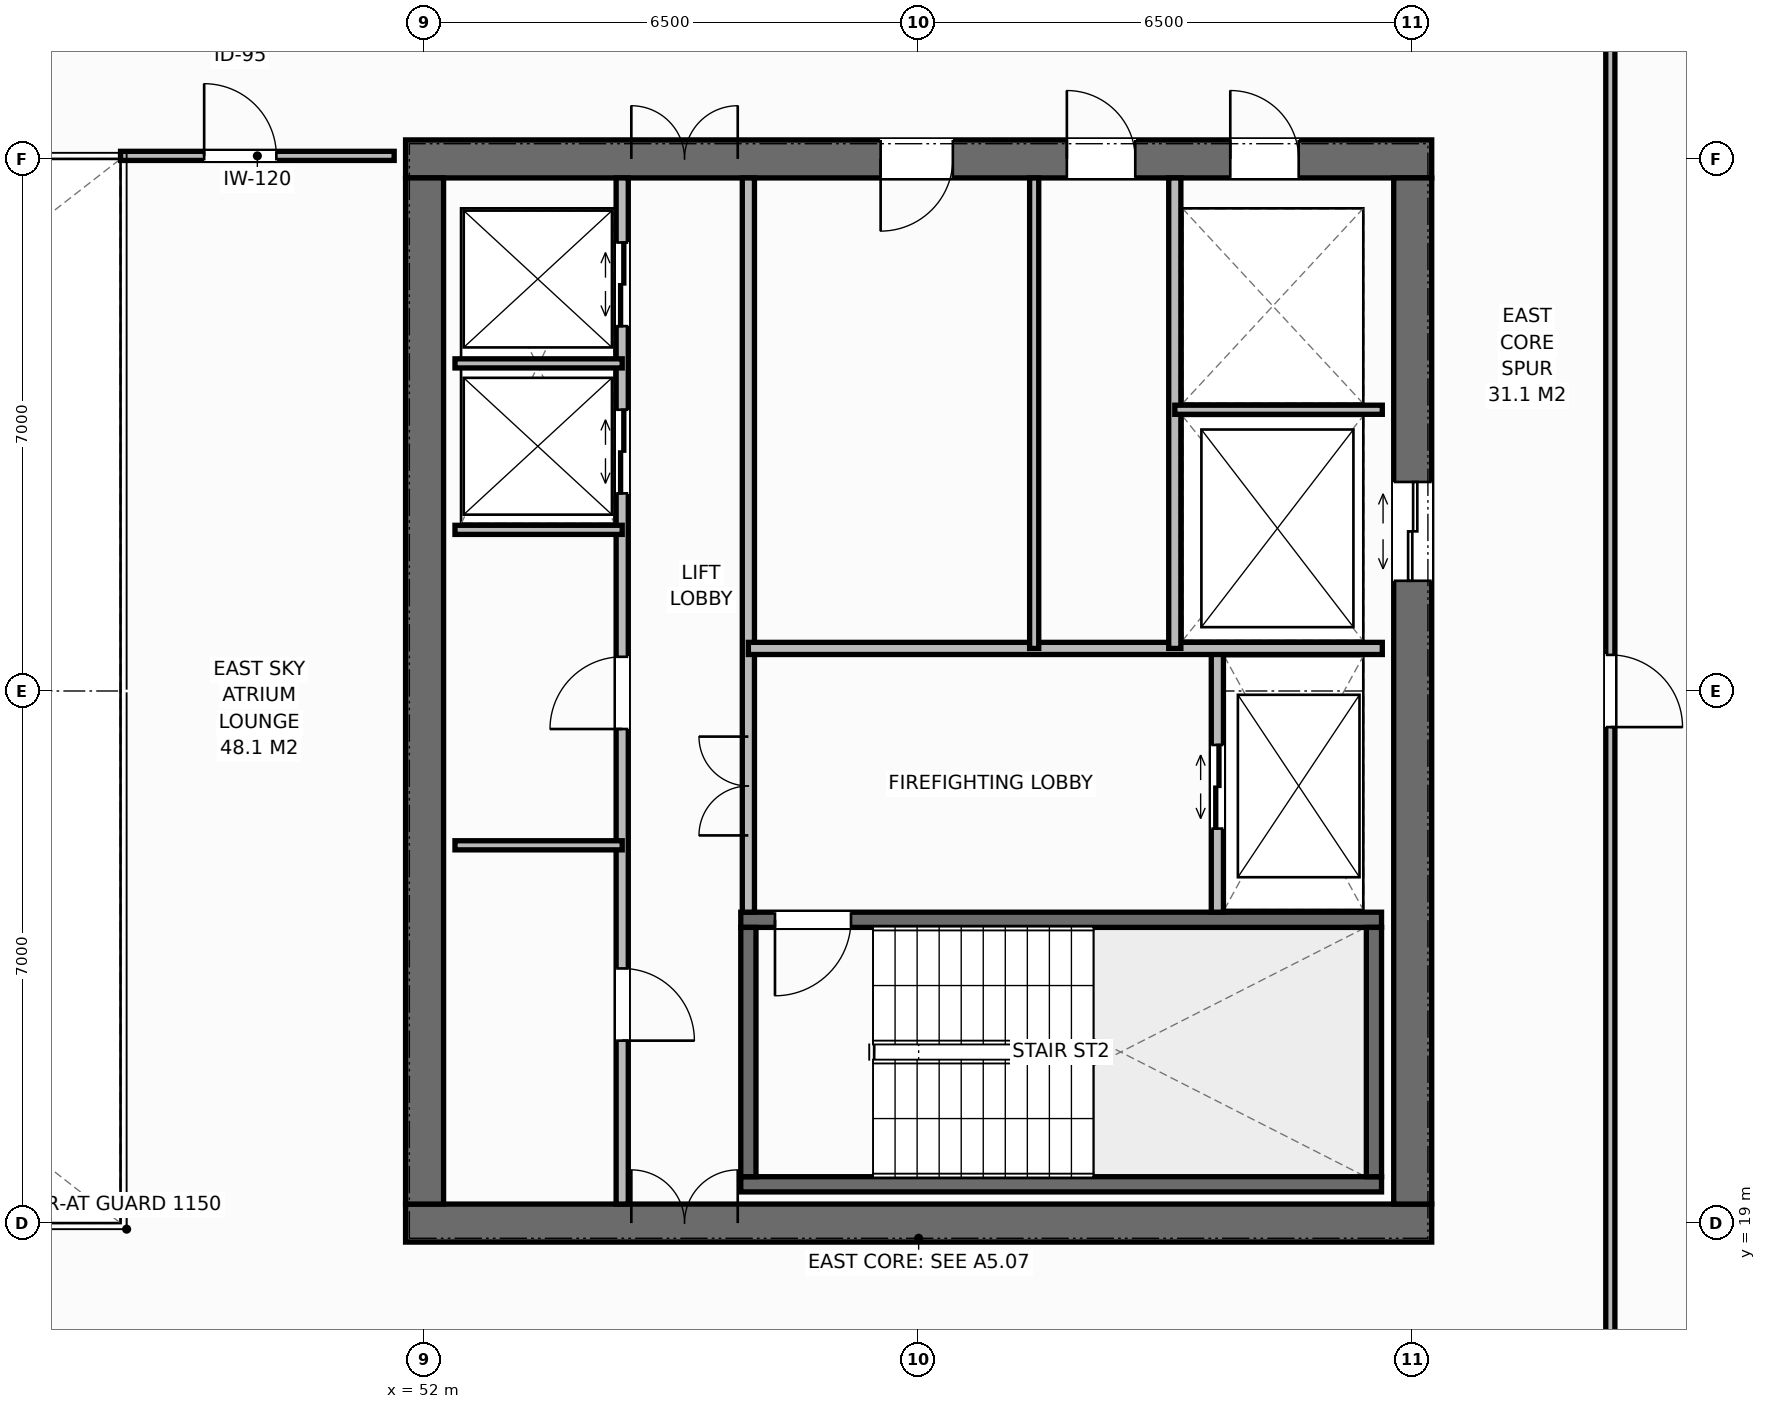
"""IFC4 building model, lengths in metres.
Left out: names, types, materials, properties, quantities, classifications, styles, units other than length and angle.
Written with IfcOpenShell. Run it as: python <this file> out.ifc"""

import sys

from ifc_helpers import new_model, si_unit, direction, frame, frame_2d, origin, place, context, subcontext, project, spatial, rectangle, extrude, element, fill, save


model = new_model("IFC4")
c1 = context("Model", 3, precision=1e-05, world=origin(), true_north=direction((0.0, 1.0)))
c2 = subcontext(c1, "Body", "Model", "MODEL_VIEW")
j1 = project(units=[si_unit("LENGTHUNIT", "METRE"), si_unit("PLANEANGLEUNIT", "RADIAN")], contexts=[c1])
p1 = place(None, origin())
s1 = spatial("IfcSite", under=j1, at=p1, CompositionType="ELEMENT")
p2 = place(p1, origin())
s2 = spatial("IfcBuilding", under=s1, at=p2, CompositionType="ELEMENT")
p3 = place(p2, frame((0.0, 0.0, 225.2)))
s3 = spatial("IfcBuildingStorey", under=s2, at=p3, CompositionType="ELEMENT", Elevation=225.2)
p4 = place(p3, frame((51.75, 19.0, 0.0), z_axis=(0.0, 0.0, 1.0), x_axis=(1.0, 0.0, 0.0)))
e1 = element("IfcWall", 1, at=p4, inside=s3, PredefinedType="SHEAR", context=c2, shape_type="SweptSolid", body=[
    extrude(rectangle(XDim=13.5, YDim=0.5, at=frame_2d((6.75, 0.0))), origin(), (0.0, 0.0, 1.0), 3.8),
])
p5 = place(p4, frame((2.97, 0.0, 0.0)))
e2 = element("IfcOpeningElement", 2, at=p5, cuts=e1, PredefinedType="OPENING", context=c2, shape_type="SweptSolid", body=[
    extrude(rectangle(XDim=1.4, YDim=2.2, at=frame_2d((0.7, 1.1))), frame((0.0, 0.26, 0.0), z_axis=(0.0, -1.0, 0.0), x_axis=(1.0, 0.0, 0.0)), (0.0, 0.0, 1.0), 0.52),
])
p6 = place(p3, frame((51.75, 33.0, 0.0), z_axis=(0.0, 0.0, 1.0), x_axis=(1.0, 0.0, 0.0)))
e3 = element("IfcWall", 3, at=p6, inside=s3, PredefinedType="SHEAR", context=c2, shape_type="SweptSolid", body=[
    extrude(rectangle(XDim=13.5, YDim=0.5, at=frame_2d((6.75, 0.0))), origin(), (0.0, 0.0, 1.0), 3.8),
])
p7 = place(p6, frame((2.97, 0.0, 0.0)))
e4 = element("IfcOpeningElement", 4, at=p7, cuts=e3, PredefinedType="OPENING", context=c2, shape_type="SweptSolid", body=[
    extrude(rectangle(XDim=1.4, YDim=2.2, at=frame_2d((0.7, 1.1))), frame((0.0, 0.26, 0.0), z_axis=(0.0, -1.0, 0.0), x_axis=(1.0, 0.0, 0.0)), (0.0, 0.0, 1.0), 0.52),
])
p8 = place(p6, frame((10.85, 0.0, 0.0)))
e5 = element("IfcOpeningElement", 5, at=p8, cuts=e3, PredefinedType="OPENING", context=c2, shape_type="SweptSolid", body=[
    extrude(rectangle(XDim=0.9, YDim=2.15, at=frame_2d((0.45, 1.075))), frame((0.0, 0.26, 0.0), z_axis=(0.0, -1.0, 0.0), x_axis=(1.0, 0.0, 0.0)), (0.0, 0.0, 1.0), 0.52),
])
p9 = place(p6, frame((6.25, 0.0, 0.0)))
e6 = element("IfcOpeningElement", 6, at=p9, cuts=e3, PredefinedType="OPENING", context=c2, shape_type="SweptSolid", body=[
    extrude(rectangle(XDim=0.95, YDim=2.15, at=frame_2d((0.475, 1.075))), frame((0.0, 0.26, 0.0), z_axis=(0.0, -1.0, 0.0), x_axis=(1.0, 0.0, 0.0)), (0.0, 0.0, 1.0), 0.52),
])
p10 = place(p6, frame((8.7, 0.0, 0.0)))
e7 = element("IfcOpeningElement", 7, at=p10, cuts=e3, PredefinedType="OPENING", context=c2, shape_type="SweptSolid", body=[
    extrude(rectangle(XDim=0.9, YDim=2.15, at=frame_2d((0.45, 1.075))), frame((0.0, 0.26, 0.0), z_axis=(0.0, -1.0, 0.0), x_axis=(1.0, 0.0, 0.0)), (0.0, 0.0, 1.0), 0.52),
])
p11 = place(p3, frame((52.0, 19.25, 0.0), z_axis=(0.0, 0.0, 1.0), x_axis=(0.0, 1.0, 0.0)))
e8 = element("IfcWall", 8, at=p11, inside=s3, PredefinedType="SHEAR", context=c2, shape_type="SweptSolid", body=[
    extrude(rectangle(XDim=13.5, YDim=0.5, at=frame_2d((6.75, 0.0))), origin(), (0.0, 0.0, 1.0), 3.8),
])
p12 = place(p3, frame((65.0, 19.25, 0.0), z_axis=(0.0, 0.0, 1.0), x_axis=(0.0, 1.0, 0.0)))
e9 = element("IfcWall", 9, at=p12, inside=s3, PredefinedType="SHEAR", context=c2, shape_type="SweptSolid", body=[
    extrude(rectangle(XDim=13.5, YDim=0.5, at=frame_2d((6.75, 0.0))), origin(), (0.0, 0.0, 1.0), 3.8),
])
p13 = place(p12, frame((8.2, 0.0, 0.0)))
e10 = element("IfcOpeningElement", 10, at=p13, cuts=e9, PredefinedType="OPENING", context=c2, shape_type="SweptSolid", body=[
    extrude(rectangle(XDim=1.3, YDim=2.2, at=frame_2d((0.65, 1.1))), frame((0.0, 0.26, 0.0), z_axis=(0.0, -1.0, 0.0), x_axis=(1.0, 0.0, 0.0)), (0.0, 0.0, 1.0), 0.52),
])
p14 = place(p3, frame((56.16, 19.51, 0.0), z_axis=(0.0, 0.0, 1.0), x_axis=(1.0, 0.0, 0.0)))
e11 = element("IfcWall", 11, at=p14, inside=s3, PredefinedType="SHEAR", context=c2, shape_type="SweptSolid", body=[
    extrude(rectangle(XDim=8.43, YDim=0.2, at=frame_2d((4.215, 0.0))), origin(), (0.0, 0.0, 1.0), 3.8),
])
p15 = place(p3, frame((56.16, 22.99, 0.0), z_axis=(0.0, 0.0, 1.0), x_axis=(1.0, 0.0, 0.0)))
e12 = element("IfcWall", 12, at=p15, inside=s3, PredefinedType="SHEAR", context=c2, shape_type="SweptSolid", body=[
    extrude(rectangle(XDim=8.43, YDim=0.2, at=frame_2d((4.215, 0.0))), origin(), (0.0, 0.0, 1.0), 3.8),
])
p16 = place(p15, frame((0.45, 0.0, 0.0)))
e13 = element("IfcOpeningElement", 13, at=p16, cuts=e12, PredefinedType="OPENING", context=c2, shape_type="SweptSolid", body=[
    extrude(rectangle(XDim=1.0, YDim=2.15, at=frame_2d((0.5, 1.075))), frame((0.0, 0.11, 0.0), z_axis=(0.0, -1.0, 0.0), x_axis=(1.0, 0.0, 0.0)), (0.0, 0.0, 1.0), 0.22),
])
for number, where, z_axis, x_axis in (
    (14, (56.26, 19.61, 0.0), (0.0, 0.0, 1.0), (0.0, 1.0, 0.0)),
    (15, (64.49, 19.61, 0.0), (0.0, 0.0, 1.0), (0.0, 1.0, 0.0)),
):
    element("IfcWall", number, at=place(p3, frame(where, z_axis=z_axis, x_axis=x_axis)), inside=s3, PredefinedType="SHEAR", context=c2, shape_type="SweptSolid", body=[
        extrude(rectangle(XDim=3.28, YDim=0.2, at=frame_2d((1.64, 0.0))), origin(), (0.0, 0.0, 1.0), 3.8),
    ])
p17 = place(p3, frame((54.6, 19.25, 0.0), z_axis=(0.0, 0.0, 1.0), x_axis=(0.0, 1.0, 0.0)))
e16 = element("IfcWall", 16, at=p17, inside=s3, PredefinedType="STANDARD", context=c2, shape_type="SweptSolid", body=[
    extrude(rectangle(XDim=13.5, YDim=0.16, at=frame_2d((6.75, 0.0))), origin(), (0.0, 0.0, 1.0), 3.58),
])
p18 = place(p17, frame((2.15, 0.0, 0.0)))
e17 = element("IfcOpeningElement", 17, at=p18, cuts=e16, PredefinedType="OPENING", context=c2, shape_type="SweptSolid", body=[
    extrude(rectangle(XDim=0.95, YDim=2.15, at=frame_2d((0.475, 1.075))), frame((0.0, 0.09, 0.0), z_axis=(0.0, -1.0, 0.0), x_axis=(1.0, 0.0, 0.0)), (0.0, 0.0, 1.0), 0.18),
])
p19 = place(p17, frame((6.25, 0.0, 0.0)))
e18 = element("IfcOpeningElement", 18, at=p19, cuts=e16, PredefinedType="OPENING", context=c2, shape_type="SweptSolid", body=[
    extrude(rectangle(XDim=0.95, YDim=2.15, at=frame_2d((0.475, 1.075))), frame((0.0, 0.09, 0.0), z_axis=(0.0, -1.0, 0.0), x_axis=(1.0, 0.0, 0.0)), (0.0, 0.0, 1.0), 0.18),
])
p20 = place(p17, frame((9.35, 0.0, 0.0)))
e19 = element("IfcOpeningElement", 19, at=p20, cuts=e16, PredefinedType="OPENING", context=c2, shape_type="SweptSolid", body=[
    extrude(rectangle(XDim=1.1, YDim=2.2, at=frame_2d((0.55, 1.1))), frame((0.0, 0.09, 0.0), z_axis=(0.0, -1.0, 0.0), x_axis=(1.0, 0.0, 0.0)), (0.0, 0.0, 1.0), 0.18),
])
p21 = place(p17, frame((11.55, 0.0, 0.0)))
e20 = element("IfcOpeningElement", 20, at=p21, cuts=e16, PredefinedType="OPENING", context=c2, shape_type="SweptSolid", body=[
    extrude(rectangle(XDim=1.1, YDim=2.2, at=frame_2d((0.55, 1.1))), frame((0.0, 0.09, 0.0), z_axis=(0.0, -1.0, 0.0), x_axis=(1.0, 0.0, 0.0)), (0.0, 0.0, 1.0), 0.18),
])
p22 = place(p3, frame((56.26, 23.09, 0.0), z_axis=(0.0, 0.0, 1.0), x_axis=(0.0, 1.0, 0.0)))
e21 = element("IfcWall", 21, at=p22, inside=s3, PredefinedType="STANDARD", context=c2, shape_type="SweptSolid", body=[
    extrude(rectangle(XDim=9.66, YDim=0.16, at=frame_2d((4.83, 0.0))), origin(), (0.0, 0.0, 1.0), 3.58),
])
p23 = place(p22, frame((1.01, 0.0, 0.0)))
e22 = element("IfcOpeningElement", 22, at=p23, cuts=e21, PredefinedType="OPENING", context=c2, shape_type="SweptSolid", body=[
    extrude(rectangle(XDim=1.3, YDim=2.2, at=frame_2d((0.65, 1.1))), frame((0.0, 0.09, 0.0), z_axis=(0.0, -1.0, 0.0), x_axis=(1.0, 0.0, 0.0)), (0.0, 0.0, 1.0), 0.18),
])
for number, where, z_axis, x_axis in (
    (23, (52.4, 23.97, 0.0), (0.0, 0.0, 1.0), (1.0, 0.0, 0.0)),
    (24, (52.4, 28.12, 0.0), (0.0, 0.0, 1.0), (1.0, 0.0, 0.0)),
    (25, (52.4, 30.31, 0.0), (0.0, 0.0, 1.0), (1.0, 0.0, 0.0)),
):
    element("IfcWall", number, at=place(p3, frame(where, z_axis=z_axis, x_axis=x_axis)), inside=s3, PredefinedType="PARTITIONING", context=c2, shape_type="SweptSolid", body=[
        extrude(rectangle(XDim=2.2, YDim=0.12, at=frame_2d((1.1, 0.0))), origin(), (0.0, 0.0, 1.0), 3.58),
    ])
p24 = place(p3, frame((62.43, 23.09, 0.0), z_axis=(0.0, 0.0, 1.0), x_axis=(0.0, 1.0, 0.0)))
e26 = element("IfcWall", 26, at=p24, inside=s3, PredefinedType="STANDARD", context=c2, shape_type="SweptSolid", body=[
    extrude(rectangle(XDim=3.47, YDim=0.16, at=frame_2d((1.735, 0.0))), origin(), (0.0, 0.0, 1.0), 3.58),
])
p25 = place(p24, frame((1.1, 0.0, 0.0)))
e27 = element("IfcOpeningElement", 27, at=p25, cuts=e26, PredefinedType="OPENING", context=c2, shape_type="SweptSolid", body=[
    extrude(rectangle(XDim=1.1, YDim=2.2, at=frame_2d((0.55, 1.1))), frame((0.0, 0.09, 0.0), z_axis=(0.0, -1.0, 0.0), x_axis=(1.0, 0.0, 0.0)), (0.0, 0.0, 1.0), 0.18),
])
p26 = place(p3, frame((56.26, 26.56, 0.0), z_axis=(0.0, 0.0, 1.0), x_axis=(1.0, 0.0, 0.0)))
e28 = element("IfcWall", 28, at=p26, inside=s3, PredefinedType="STANDARD", context=c2, shape_type="SweptSolid", body=[
    extrude(rectangle(XDim=8.34, YDim=0.16, at=frame_2d((4.17, 0.0))), origin(), (0.0, 0.0, 1.0), 3.58),
])
p27 = place(p3, frame((61.87, 26.56, 0.0), z_axis=(0.0, 0.0, 1.0), x_axis=(0.0, 1.0, 0.0)))
e29 = element("IfcWall", 29, at=p27, inside=s3, PredefinedType="STANDARD", context=c2, shape_type="SweptSolid", body=[
    extrude(rectangle(XDim=6.19, YDim=0.16, at=frame_2d((3.095, 0.0))), origin(), (0.0, 0.0, 1.0), 3.58),
])
p28 = place(p3, frame((61.87, 29.7, 0.0), z_axis=(0.0, 0.0, 1.0), x_axis=(1.0, 0.0, 0.0)))
e30 = element("IfcWall", 30, at=p28, inside=s3, PredefinedType="PARTITIONING", context=c2, shape_type="SweptSolid", body=[
    extrude(rectangle(XDim=2.73, YDim=0.12, at=frame_2d((1.365, 0.0))), origin(), (0.0, 0.0, 1.0), 3.58),
])
p29 = place(p3, frame((60.02, 26.56, 0.0), z_axis=(0.0, 0.0, 1.0), x_axis=(0.0, 1.0, 0.0)))
e31 = element("IfcWall", 31, at=p29, inside=s3, PredefinedType="PARTITIONING", context=c2, shape_type="SweptSolid", body=[
    extrude(rectangle(XDim=6.19, YDim=0.12, at=frame_2d((3.095, 0.0))), origin(), (0.0, 0.0, 1.0), 3.58),
])
p30 = place(p3, frame((48.0, 33.04, 0.0), z_axis=(0.0, 0.0, 1.0), x_axis=(1.0, 0.0, 0.0)))
e32 = element("IfcWall", 32, at=p30, inside=s3, PredefinedType="PARTITIONING", context=c2, shape_type="SweptSolid", body=[
    extrude(rectangle(XDim=3.6, YDim=0.12, at=frame_2d((1.8, 0.0))), origin(), (0.0, 0.0, 1.0), 3.32),
])
p31 = place(p30, frame((1.1, 0.0, 0.0)))
e33 = element("IfcOpeningElement", 33, at=p31, cuts=e32, PredefinedType="OPENING", context=c2, shape_type="SweptSolid", body=[
    extrude(rectangle(XDim=0.95, YDim=2.15, at=frame_2d((0.475, 1.075))), frame((0.0, 0.07, 0.0), z_axis=(0.0, -1.0, 0.0), x_axis=(1.0, 0.0, 0.0)), (0.0, 0.0, 1.0), 0.14),
])
p32 = place(p3, frame((67.6, 16.5, 0.0), z_axis=(0.0, 0.0, 1.0), x_axis=(0.0, 1.0, 0.0)))
e34 = element("IfcWall", 34, at=p32, inside=s3, PredefinedType="PARTITIONING", context=c2, shape_type="SweptSolid", body=[
    extrude(rectangle(XDim=19.0, YDim=0.12, at=frame_2d((9.5, 0.0))), origin(), (0.0, 0.0, 1.0), 3.58),
])
p33 = place(p32, frame((9.025, 0.0, 0.0)))
e35 = element("IfcOpeningElement", 35, at=p33, cuts=e34, PredefinedType="OPENING", context=c2, shape_type="SweptSolid", body=[
    extrude(rectangle(XDim=0.95, YDim=2.15, at=frame_2d((0.475, 1.075))), frame((0.0, 0.07, 0.0), z_axis=(0.0, -1.0, 0.0), x_axis=(1.0, 0.0, 0.0)), (0.0, 0.0, 1.0), 0.14),
])
p34 = place(p5, origin())
e36 = element("IfcDoor", 36, at=p34, inside=s3, OperationType="DOUBLE_DOOR_SINGLE_SWING", PredefinedType="DOOR", context=c2, shape_type="SweptSolid", body=[
    extrude(rectangle(XDim=1.4, YDim=2.2, at=frame_2d((0.7, 1.1))), frame((0.0, 0.075, 0.0), z_axis=(0.0, -1.0, 0.0), x_axis=(1.0, 0.0, 0.0)), (0.0, 0.0, 1.0), 0.05),
])
fill(e2, e36)
p35 = place(p7, origin())
e37 = element("IfcDoor", 37, at=p35, inside=s3, OperationType="DOUBLE_DOOR_SINGLE_SWING", PredefinedType="DOOR", context=c2, shape_type="SweptSolid", body=[
    extrude(rectangle(XDim=1.4, YDim=2.2, at=frame_2d((0.7, 1.1))), frame((0.0, -0.025, 0.0), z_axis=(0.0, -1.0, 0.0), x_axis=(1.0, 0.0, 0.0)), (0.0, 0.0, 1.0), 0.05),
])
fill(e4, e37)
p36 = place(p18, origin())
e38 = element("IfcDoor", 38, at=p36, inside=s3, OperationType="SINGLE_SWING_RIGHT", PredefinedType="DOOR", context=c2, shape_type="SweptSolid", body=[
    extrude(rectangle(XDim=0.95, YDim=2.15, at=frame_2d((0.475, 1.075))), frame((0.0, 0.025, 0.0), z_axis=(0.0, -1.0, 0.0), x_axis=(1.0, 0.0, 0.0)), (0.0, 0.0, 1.0), 0.05),
])
fill(e17, e38)
p37 = place(p19, origin())
e39 = element("IfcDoor", 39, at=p37, inside=s3, OperationType="SINGLE_SWING_LEFT", PredefinedType="DOOR", context=c2, shape_type="SweptSolid", body=[
    extrude(rectangle(XDim=0.95, YDim=2.15, at=frame_2d((0.475, 1.075))), frame((0.0, 0.025, 0.0), z_axis=(0.0, -1.0, 0.0), x_axis=(1.0, 0.0, 0.0)), (0.0, 0.0, 1.0), 0.05),
])
fill(e18, e39)
p38 = place(p20, origin())
e40 = element("IfcDoor", 40, at=p38, inside=s3, OperationType="DOUBLE_DOOR_SLIDING", PredefinedType="DOOR", context=c2, shape_type="SweptSolid", body=[
    extrude(rectangle(XDim=1.1, YDim=2.2, at=frame_2d((0.55, 1.1))), frame((0.0, 0.025, 0.0), z_axis=(0.0, -1.0, 0.0), x_axis=(1.0, 0.0, 0.0)), (0.0, 0.0, 1.0), 0.05),
])
fill(e19, e40)
p39 = place(p21, origin())
e41 = element("IfcDoor", 41, at=p39, inside=s3, OperationType="DOUBLE_DOOR_SLIDING", PredefinedType="DOOR", context=c2, shape_type="SweptSolid", body=[
    extrude(rectangle(XDim=1.1, YDim=2.2, at=frame_2d((0.55, 1.1))), frame((0.0, 0.025, 0.0), z_axis=(0.0, -1.0, 0.0), x_axis=(1.0, 0.0, 0.0)), (0.0, 0.0, 1.0), 0.05),
])
fill(e20, e41)
p40 = place(p16, origin())
e42 = element("IfcDoor", 42, at=p40, inside=s3, OperationType="SINGLE_SWING_RIGHT", PredefinedType="DOOR", context=c2, shape_type="SweptSolid", body=[
    extrude(rectangle(XDim=1.0, YDim=2.15, at=frame_2d((0.5, 1.075))), frame((0.0, 0.025, 0.0), z_axis=(0.0, -1.0, 0.0), x_axis=(1.0, 0.0, 0.0)), (0.0, 0.0, 1.0), 0.05),
])
fill(e13, e42)
p41 = place(p25, origin())
e43 = element("IfcDoor", 43, at=p41, inside=s3, OperationType="DOUBLE_DOOR_SLIDING", PredefinedType="DOOR", context=c2, shape_type="SweptSolid", body=[
    extrude(rectangle(XDim=1.1, YDim=2.2, at=frame_2d((0.55, 1.1))), frame((0.0, 0.025, 0.0), z_axis=(0.0, -1.0, 0.0), x_axis=(1.0, 0.0, 0.0)), (0.0, 0.0, 1.0), 0.05),
])
fill(e27, e43)
p42 = place(p23, origin())
e44 = element("IfcDoor", 44, at=p42, inside=s3, OperationType="DOUBLE_DOOR_SINGLE_SWING", PredefinedType="DOOR", context=c2, shape_type="SweptSolid", body=[
    extrude(rectangle(XDim=1.3, YDim=2.2, at=frame_2d((0.65, 1.1))), frame((0.0, 0.025, 0.0), z_axis=(0.0, -1.0, 0.0), x_axis=(1.0, 0.0, 0.0)), (0.0, 0.0, 1.0), 0.05),
])
fill(e22, e44)
p43 = place(p13, origin())
e45 = element("IfcDoor", 45, at=p43, inside=s3, OperationType="DOUBLE_DOOR_SLIDING", PredefinedType="DOOR", context=c2, shape_type="SweptSolid", body=[
    extrude(rectangle(XDim=1.3, YDim=2.2, at=frame_2d((0.65, 1.1))), frame((0.0, 0.025, 0.0), z_axis=(0.0, -1.0, 0.0), x_axis=(1.0, 0.0, 0.0)), (0.0, 0.0, 1.0), 0.05),
])
fill(e10, e45)
p44 = place(p8, origin())
e46 = element("IfcDoor", 46, at=p44, inside=s3, OperationType="SINGLE_SWING_LEFT", PredefinedType="DOOR", context=c2, shape_type="SweptSolid", body=[
    extrude(rectangle(XDim=0.9, YDim=2.15, at=frame_2d((0.45, 1.075))), frame((0.0, -0.025, 0.0), z_axis=(0.0, -1.0, 0.0), x_axis=(1.0, 0.0, 0.0)), (0.0, 0.0, 1.0), 0.05),
])
fill(e5, e46)
p45 = place(p9, origin())
e47 = element("IfcDoor", 47, at=p45, inside=s3, OperationType="SINGLE_SWING_RIGHT", PredefinedType="DOOR", context=c2, shape_type="SweptSolid", body=[
    extrude(rectangle(XDim=0.95, YDim=2.15, at=frame_2d((0.475, 1.075))), frame((0.0, -0.025, 0.0), z_axis=(0.0, -1.0, 0.0), x_axis=(1.0, 0.0, 0.0)), (0.0, 0.0, 1.0), 0.05),
])
fill(e6, e47)
p46 = place(p10, origin())
e48 = element("IfcDoor", 48, at=p46, inside=s3, OperationType="SINGLE_SWING_LEFT", PredefinedType="DOOR", context=c2, shape_type="SweptSolid", body=[
    extrude(rectangle(XDim=0.9, YDim=2.15, at=frame_2d((0.45, 1.075))), frame((0.0, -0.025, 0.0), z_axis=(0.0, -1.0, 0.0), x_axis=(1.0, 0.0, 0.0)), (0.0, 0.0, 1.0), 0.05),
])
fill(e7, e48)
p47 = place(p31, origin())
e49 = element("IfcDoor", 49, at=p47, inside=s3, OperationType="SINGLE_SWING_LEFT", PredefinedType="DOOR", context=c2, shape_type="SweptSolid", body=[
    extrude(rectangle(XDim=0.95, YDim=2.15, at=frame_2d((0.475, 1.075))), frame((0.0, 0.025, 0.0), z_axis=(0.0, -1.0, 0.0), x_axis=(1.0, 0.0, 0.0)), (0.0, 0.0, 1.0), 0.05),
])
fill(e33, e49)
p48 = place(p33, origin())
e50 = element("IfcDoor", 50, at=p48, inside=s3, OperationType="SINGLE_SWING_RIGHT", PredefinedType="DOOR", context=c2, shape_type="SweptSolid", body=[
    extrude(rectangle(XDim=0.95, YDim=2.15, at=frame_2d((0.475, 1.075))), frame((0.0, 0.025, 0.0), z_axis=(0.0, -1.0, 0.0), x_axis=(1.0, 0.0, 0.0)), (0.0, 0.0, 1.0), 0.05),
])
fill(e35, e50)
save(model, sys.argv[1])
